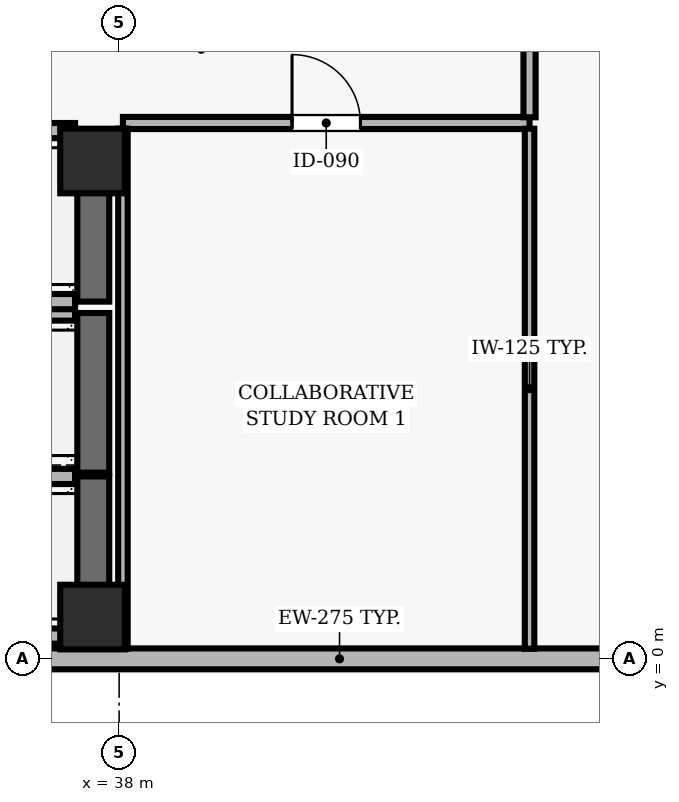
"""IFC4 building model, lengths in metres.
Left out: names, types, materials, properties, quantities, classifications, styles, units other than length and angle.
Written with IfcOpenShell. Run it as: python <this file> out.ifc"""

import sys

from ifc_helpers import new_model, si_unit, direction, frame, frame_2d, origin, origin_2d, place, context, subcontext, project, spatial, rectangle, extrude, element, fill, save


model = new_model("IFC4")
c1 = context("Model", 3, precision=1e-05, world=origin(), true_north=direction((0.0, 1.0)))
c2 = subcontext(c1, "Body", "Model", "MODEL_VIEW")
j1 = project(units=[si_unit("LENGTHUNIT", "METRE"), si_unit("PLANEANGLEUNIT", "RADIAN")], contexts=[c1])
p1 = place(None, origin())
s1 = spatial("IfcSite", under=j1, at=p1, CompositionType="ELEMENT")
p2 = place(p1, origin())
s2 = spatial("IfcBuilding", under=s1, at=p2, CompositionType="ELEMENT")
p3 = place(p2, frame((0.0, 0.0, 287.2)))
s3 = spatial("IfcBuildingStorey", under=s2, at=p3, CompositionType="ELEMENT", Elevation=287.2)
for number, where, z_axis, x_axis in (
    (1, (37.65, 0.55, 0.0), (0.0, 0.0, 1.0), (1.0, 0.0, 0.0)),
    (2, (37.65, 6.55, 0.0), (0.0, 0.0, 1.0), (1.0, 0.0, 0.0)),
):
    element("IfcColumn", number, at=place(p3, frame(where, z_axis=z_axis, x_axis=x_axis)), inside=s3, PredefinedType="COLUMN", context=c2, shape_type="SweptSolid", body=[
        extrude(rectangle(XDim=0.85, YDim=0.85, at=origin_2d()), origin(), (0.0, 0.0, 1.0), 3.9),
    ])
p4 = place(p3, frame((24.5, 0.0, 0.0), z_axis=(0.0, 0.0, 1.0), x_axis=(1.0, 0.0, 0.0)))
e3 = element("IfcWall", 3, at=p4, inside=s3, PredefinedType="SOLIDWALL", context=c2, shape_type="SweptSolid", body=[
    extrude(rectangle(XDim=32.8, YDim=0.275, at=frame_2d((16.4, 0.0))), origin(), (0.0, 0.0, 1.0), 3.69),
])
p5 = place(p4, frame((1.533, 0.0, 0.9)))
e4 = element("IfcOpeningElement", 4, at=p5, cuts=e3, PredefinedType="OPENING", context=c2, shape_type="SweptSolid", body=[
    extrude(rectangle(XDim=2.4, YDim=2.2, at=frame_2d((1.2, 1.1))), frame((0.0, 0.147, 0.0), z_axis=(0.0, -1.0, 0.0), x_axis=(1.0, 0.0, 0.0)), (0.0, 0.0, 1.0), 0.295),
])
p6 = place(p3, frame((37.66, 0.3, 0.0), z_axis=(0.0, 0.0, 1.0), x_axis=(0.0, 1.0, 0.0)))
e5 = element("IfcWall", 5, at=p6, inside=s3, PredefinedType="SHEAR", context=c2, shape_type="SweptSolid", body=[
    extrude(rectangle(XDim=2.1, YDim=0.42, at=frame_2d((1.05, 0.0))), origin(), (0.0, 0.0, 1.0), 3.69),
])
for number, where, z_axis, x_axis in (
    (6, (35.28, 0.3, 0.0), (0.0, 0.0, 1.0), (1.0, 0.0, 0.0)),
    (7, (37.42, 2.4, 0.0), (0.0, 0.0, 1.0), (-1.0, 0.0, 0.0)),
):
    element("IfcWall", number, at=place(p3, frame(where, z_axis=z_axis, x_axis=x_axis)), inside=s3, PredefinedType="SOLIDWALL", context=c2, shape_type="SweptSolid", body=[
        extrude(rectangle(XDim=2.14, YDim=0.2, at=frame_2d((1.07, 0.0))), origin(), (0.0, 0.0, 1.0), 3.69),
    ])
p7 = place(p3, frame((37.66, 2.45, 0.0), z_axis=(0.0, 0.0, 1.0), x_axis=(0.0, 1.0, 0.0)))
e8 = element("IfcWall", 8, at=p7, inside=s3, PredefinedType="SHEAR", context=c2, shape_type="SweptSolid", body=[
    extrude(rectangle(XDim=2.1, YDim=0.42, at=frame_2d((1.05, 0.0))), origin(), (0.0, 0.0, 1.0), 3.69),
])
p8 = place(p3, frame((37.42, 4.55, 0.0), z_axis=(0.0, 0.0, 1.0), x_axis=(-1.0, 0.0, 0.0)))
e9 = element("IfcWall", 9, at=p8, inside=s3, PredefinedType="SOLIDWALL", context=c2, shape_type="SweptSolid", body=[
    extrude(rectangle(XDim=2.14, YDim=0.2, at=frame_2d((1.07, 0.0))), origin(), (0.0, 0.0, 1.0), 3.69),
])
p9 = place(p3, frame((37.66, 4.7, 0.0), z_axis=(0.0, 0.0, 1.0), x_axis=(0.0, 1.0, 0.0)))
e10 = element("IfcWall", 10, at=p9, inside=s3, PredefinedType="SHEAR", context=c2, shape_type="SweptSolid", body=[
    extrude(rectangle(XDim=2.25, YDim=0.42, at=frame_2d((1.125, 0.0))), origin(), (0.0, 0.0, 1.0), 3.69),
])
for number, where, z_axis, x_axis in (
    (11, (35.28, 4.7, 0.0), (0.0, 0.0, 1.0), (1.0, 0.0, 0.0)),
    (12, (37.42, 6.95, 0.0), (0.0, 0.0, 1.0), (-1.0, 0.0, 0.0)),
):
    element("IfcWall", number, at=place(p3, frame(where, z_axis=z_axis, x_axis=x_axis)), inside=s3, PredefinedType="SOLIDWALL", context=c2, shape_type="SweptSolid", body=[
        extrude(rectangle(XDim=2.14, YDim=0.2, at=frame_2d((1.07, 0.0))), origin(), (0.0, 0.0, 1.0), 3.69),
    ])
p10 = place(p3, frame((38.05, 7.05, 0.0), z_axis=(0.0, 0.0, 1.0), x_axis=(1.0, 0.0, 0.0)))
e13 = element("IfcWall", 13, at=p10, inside=s3, PredefinedType="PARTITIONING", context=c2, shape_type="SweptSolid", body=[
    extrude(rectangle(XDim=5.35, YDim=0.16, at=frame_2d((2.675, 0.0))), origin(), (0.0, 0.0, 1.0), 3.69),
])
p11 = place(p10, frame((2.225, 0.0, 0.0)))
e14 = element("IfcOpeningElement", 14, at=p11, cuts=e13, PredefinedType="OPENING", context=c2, shape_type="SweptSolid", body=[
    extrude(rectangle(XDim=0.9, YDim=2.1, at=frame_2d((0.45, 1.05))), frame((0.0, 0.09, 0.0), z_axis=(0.0, -1.0, 0.0), x_axis=(1.0, 0.0, 0.0)), (0.0, 0.0, 1.0), 0.18),
])
p12 = place(p3, frame((38.05, 6.975, 0.0), z_axis=(0.0, 0.0, 1.0), x_axis=(0.0, -1.0, 0.0)))
e15 = element("IfcWall", 15, at=p12, inside=s3, PredefinedType="PARTITIONING", context=c2, shape_type="SweptSolid", body=[
    extrude(rectangle(XDim=6.842, YDim=0.125, at=frame_2d((3.421, 0.0))), origin(), (0.0, 0.0, 1.0), 3.221),
])
p13 = place(p3, frame((43.4, 0.133, 0.0), z_axis=(0.0, 0.0, 1.0), x_axis=(0.0, 1.0, 0.0)))
e16 = element("IfcWall", 16, at=p13, inside=s3, PredefinedType="PARTITIONING", context=c2, shape_type="SweptSolid", body=[
    extrude(rectangle(XDim=6.842, YDim=0.125, at=frame_2d((3.421, 0.0))), origin(), (0.0, 0.0, 1.0), 3.69),
])
p14 = place(p3, frame((43.4, 7.125, 0.0), z_axis=(0.0, 0.0, 1.0), x_axis=(0.0, 1.0, 0.0)))
e17 = element("IfcWall", 17, at=p14, inside=s3, PredefinedType="PARTITIONING", context=c2, shape_type="SweptSolid", body=[
    extrude(rectangle(XDim=1.05, YDim=0.16, at=frame_2d((0.525, 0.0))), origin(), (0.0, 0.0, 1.0), 3.69),
])
p15 = place(p11, origin())
e18 = element("IfcDoor", 18, at=p15, inside=s3, OperationType="SINGLE_SWING_LEFT", PredefinedType="DOOR", context=c2, shape_type="SweptSolid", body=[
    extrude(rectangle(XDim=0.9, YDim=2.1, at=frame_2d((0.45, 1.05))), frame((0.0, 0.025, 0.0), z_axis=(0.0, -1.0, 0.0), x_axis=(1.0, 0.0, 0.0)), (0.0, 0.0, 1.0), 0.05),
])
fill(e14, e18)
save(model, sys.argv[1])
